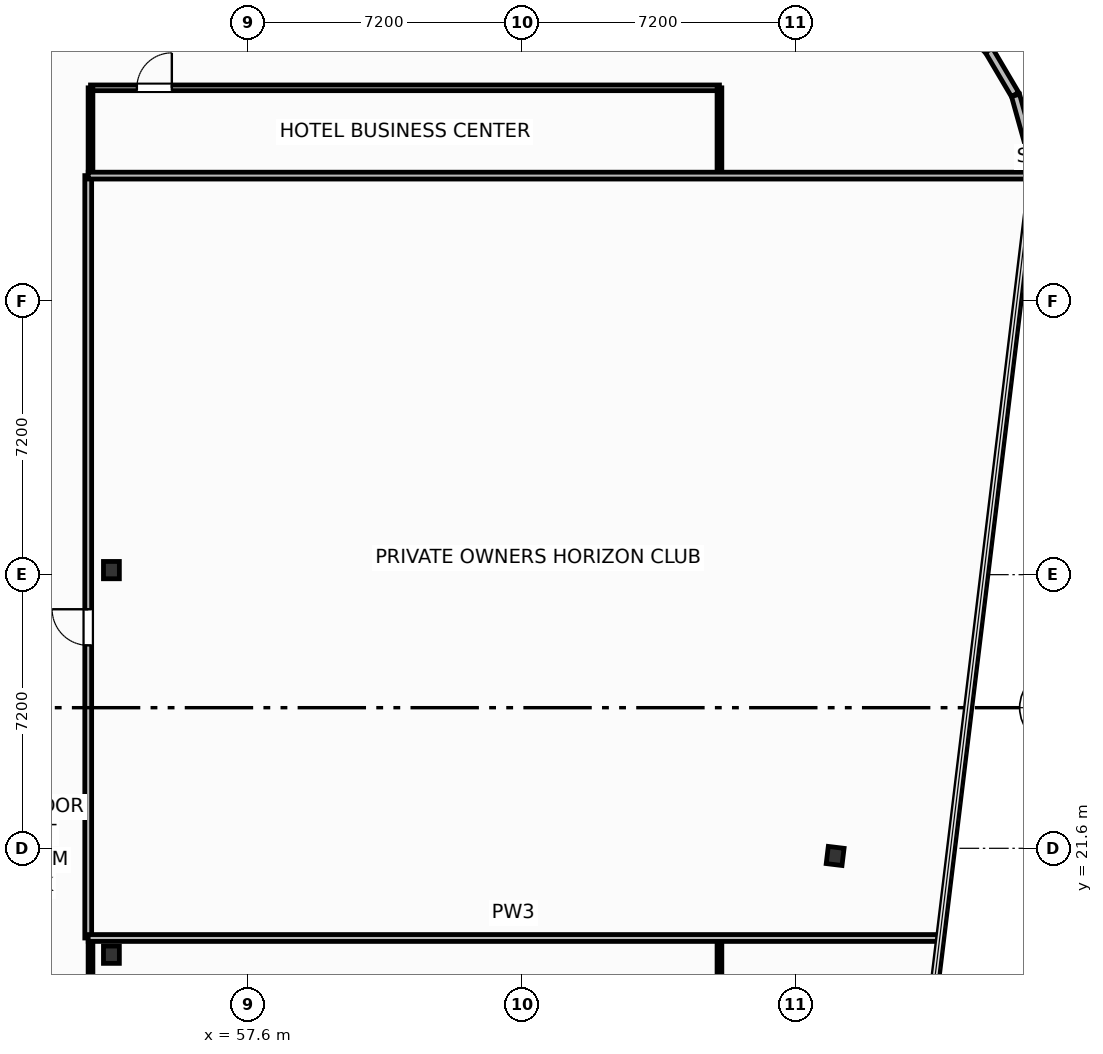
"""IFC4 building model, lengths in metres.
Left out: names, types, materials, properties, quantities, classifications, styles, units other than length and angle.
Written with IfcOpenShell. Run it as: python <this file> out.ifc"""

import sys

from ifc_helpers import new_model, si_unit, direction, frame, frame_2d, origin, origin_2d, place, context, subcontext, project, spatial, rectangle, i_section, extrude, element, fill, save


model = new_model("IFC4")
c1 = context("Model", 3, precision=1e-05, world=origin(), true_north=direction((0.0, 1.0)))
c2 = subcontext(c1, "Body", "Model", "MODEL_VIEW")
j1 = project(units=[si_unit("LENGTHUNIT", "METRE"), si_unit("PLANEANGLEUNIT", "RADIAN")], contexts=[c1])
p1 = place(None, origin())
s1 = spatial("IfcSite", under=j1, at=p1, CompositionType="ELEMENT")
p2 = place(p1, origin())
s2 = spatial("IfcBuilding", under=s1, at=p2, CompositionType="ELEMENT")
p3 = place(p2, frame((0.0, 0.0, 158.7)))
s3 = spatial("IfcBuildingStorey", under=s2, at=p3, CompositionType="ELEMENT", Elevation=158.7)
for number, where, z_axis, x_axis in (
    (1, (54.0, 18.8, 0.0), (0.0, 0.0, 1.0), (1.0, 0.0, 0.0)),
    (2, (54.0, 28.92, 0.0), (0.0, 0.0, 1.0), (1.0, 0.0, 0.0)),
    (3, (73.044, 21.399, 0.0), (0.0, 0.0, 1.0), (0.993, -0.12, 0.0)),
):
    element("IfcColumn", number, at=place(p3, frame(where, z_axis=z_axis, x_axis=x_axis)), inside=s3, PredefinedType="COLUMN", context=c2, shape_type="SweptSolid", body=[
        extrude(i_section(OverallWidth=0.418, OverallDepth=0.455, WebThickness=0.042, FlangeThickness=0.068, FilletRadius=0.025, at=origin_2d()), origin(), (0.0, 0.0, 1.0), 3.7),
    ])
p4 = place(p3, frame((78.155, 40.109, 0.0), z_axis=(0.0, 0.0, 1.0), x_axis=(-0.268639368869, 0.963240826322, 0.0)))
e4 = element("IfcWall", 4, at=p4, inside=s3, PredefinedType="SOLIDWALL", context=c2, shape_type="SweptSolid", body=[
    extrude(rectangle(XDim=1.353, YDim=0.22, at=frame_2d((0.677, 0.0))), origin(), (0.0, 0.0, 1.0), 2.66),
])
for number, where, z_axis, x_axis in (
    (5, (77.778, 41.434, 0.0), (0.0, 0.0, 1.0), (-0.509, 0.861, 0.0)),
    (6, (77.072, 42.616, 0.0), (0.0, 0.0, 1.0), (-0.714, 0.7, 0.0)),
):
    element("IfcWall", number, at=place(p3, frame(where, z_axis=z_axis, x_axis=x_axis)), inside=s3, PredefinedType="SOLIDWALL", context=c2, shape_type="SweptSolid", body=[
        extrude(rectangle(XDim=1.353, YDim=0.22, at=frame_2d((0.677, 0.0))), origin(), (0.0, 0.0, 1.0), 2.66),
    ])
p5 = place(p3, frame((53.45, 16.61, 0.0), z_axis=(0.0, 0.0, 1.0), x_axis=(0.0, 1.0, 0.0)))
e7 = element("IfcWall", 7, at=p5, inside=s3, PredefinedType="PARTITIONING", context=c2, shape_type="SweptSolid", body=[
    extrude(rectangle(XDim=2.63, YDim=0.125, at=frame_2d((1.315, 0.0))), origin(), (0.0, 0.0, 1.0), 1.165),
])
p6 = place(p3, frame((70.0, 16.61, 0.0), z_axis=(0.0, 0.0, 1.0), x_axis=(0.0, 1.0, 0.0)))
e8 = element("IfcWall", 8, at=p6, inside=s3, PredefinedType="PARTITIONING", context=c2, shape_type="SweptSolid", body=[
    extrude(rectangle(XDim=2.63, YDim=0.125, at=frame_2d((1.315, 0.0))), origin(), (0.0, 0.0, 1.0), 3.38),
])
p7 = place(p3, frame((53.45, 41.61, 0.0), z_axis=(0.0, 0.0, 1.0), x_axis=(1.0, 0.0, 0.0)))
e9 = element("IfcWall", 9, at=p7, inside=s3, PredefinedType="PARTITIONING", context=c2, shape_type="SweptSolid", body=[
    extrude(rectangle(XDim=16.55, YDim=0.15, at=frame_2d((8.275, 0.0))), origin(), (0.0, 0.0, 1.0), 3.38),
])
p8 = place(p7, frame((1.22, 0.0, 0.0)))
e10 = element("IfcOpeningElement", 10, at=p8, cuts=e9, PredefinedType="OPENING", context=c2, shape_type="SweptSolid", body=[
    extrude(rectangle(XDim=0.92, YDim=2.05, at=frame_2d((0.46, 1.025))), frame((0.0, 0.085, 0.0), z_axis=(0.0, -1.0, 0.0), x_axis=(1.0, 0.0, 0.0)), (0.0, 0.0, 1.0), 0.17),
])
for number, where, z_axis, x_axis in (
    (11, (53.45, 39.3, 0.0), (0.0, 0.0, 1.0), (0.0, 1.0, 0.0)),
    (12, (70.0, 39.3, 0.0), (0.0, 0.0, 1.0), (0.0, 1.0, 0.0)),
):
    element("IfcWall", number, at=place(p3, frame(where, z_axis=z_axis, x_axis=x_axis)), inside=s3, PredefinedType="PARTITIONING", context=c2, shape_type="SweptSolid", body=[
        extrude(rectangle(XDim=2.31, YDim=0.125, at=frame_2d((1.155, 0.0))), origin(), (0.0, 0.0, 1.0), 3.38),
    ])
p9 = place(p3, frame((53.39, 19.24, 0.0), z_axis=(0.0, 0.0, 1.0), x_axis=(0.0, 1.0, 0.0)))
e13 = element("IfcWall", 13, at=p9, inside=s3, PredefinedType="PARTITIONING", context=c2, shape_type="SweptSolid", body=[
    extrude(rectangle(XDim=20.06, YDim=0.18, at=frame_2d((10.03, 0.0))), origin(), (0.0, 0.0, 1.0), 3.38),
])
p10 = place(p9, frame((7.7, 0.0, 0.0)))
e14 = element("IfcOpeningElement", 14, at=p10, cuts=e13, PredefinedType="OPENING", context=c2, shape_type="SweptSolid", body=[
    extrude(rectangle(XDim=0.95, YDim=2.05, at=frame_2d((0.475, 1.025))), frame((0.0, 0.1, 0.0), z_axis=(0.0, -1.0, 0.0), x_axis=(1.0, 0.0, 0.0)), (0.0, 0.0, 1.0), 0.2),
])
p11 = place(p3, frame((53.39, 19.24, 0.0), z_axis=(0.0, 0.0, 1.0), x_axis=(1.0, 0.0, 0.0)))
e15 = element("IfcWall", 15, at=p11, inside=s3, PredefinedType="PARTITIONING", context=c2, shape_type="SweptSolid", body=[
    extrude(rectangle(XDim=22.367, YDim=0.18, at=frame_2d((11.183, 0.0))), origin(), (0.0, 0.0, 1.0), 1.165),
])
p12 = place(p3, frame((53.39, 39.3, 0.0), z_axis=(0.0, 0.0, 1.0), x_axis=(1.0, 0.0, 0.0)))
e16 = element("IfcWall", 16, at=p12, inside=s3, PredefinedType="PARTITIONING", context=c2, shape_type="SweptSolid", body=[
    extrude(rectangle(XDim=24.74, YDim=0.18, at=frame_2d((12.37, 0.0))), origin(), (0.0, 0.0, 1.0), 3.38),
])
p13 = place(p8, origin())
e17 = element("IfcDoor", 17, at=p13, inside=s3, OperationType="SINGLE_SWING_RIGHT", PredefinedType="DOOR", context=c2, shape_type="SweptSolid", body=[
    extrude(rectangle(XDim=0.92, YDim=2.05, at=frame_2d((0.46, 1.025))), frame((0.0, 0.025, 0.0), z_axis=(0.0, -1.0, 0.0), x_axis=(1.0, 0.0, 0.0)), (0.0, 0.0, 1.0), 0.05),
])
fill(e10, e17)
p14 = place(p10, origin())
e18 = element("IfcDoor", 18, at=p14, inside=s3, OperationType="SINGLE_SWING_RIGHT", PredefinedType="DOOR", context=c2, shape_type="SweptSolid", body=[
    extrude(rectangle(XDim=0.95, YDim=2.05, at=frame_2d((0.475, 1.025))), frame((0.0, 0.025, 0.0), z_axis=(0.0, -1.0, 0.0), x_axis=(1.0, 0.0, 0.0)), (0.0, 0.0, 1.0), 0.05),
])
fill(e14, e18)
save(model, sys.argv[1])
